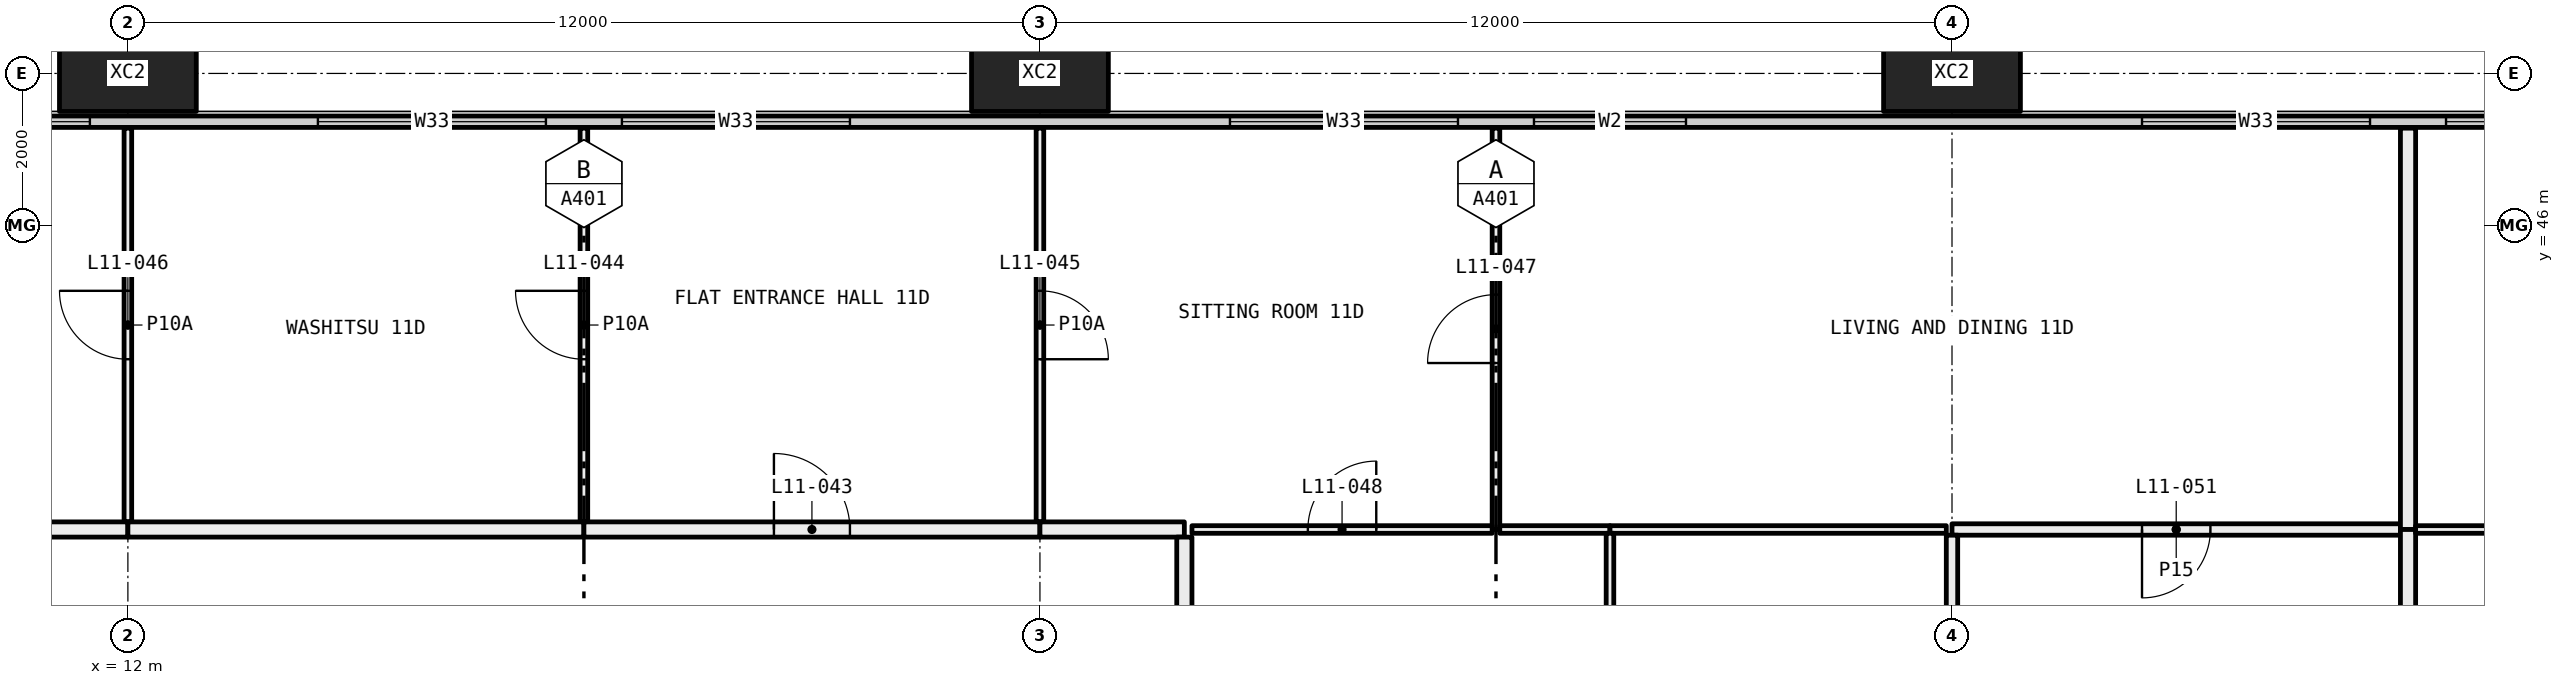
"""IFC4 building model, lengths in metres.
Left out: names, types, materials, properties, quantities, classifications, styles, units other than length and angle.
Written with IfcOpenShell. Run it as: python <this file> out.ifc"""

import sys

from ifc_helpers import new_model, si_unit, direction, frame, frame_2d, origin, origin_2d, place, context, subcontext, project, spatial, rectangle, hollow_rectangle, extrude, element, fill, save


model = new_model("IFC4")
c1 = context("Model", 3, precision=1e-05, world=origin(), true_north=direction((0.0, 1.0)))
c2 = subcontext(c1, "Body", "Model", "MODEL_VIEW")
j1 = project(units=[si_unit("LENGTHUNIT", "METRE"), si_unit("PLANEANGLEUNIT", "RADIAN")], contexts=[c1])
p1 = place(None, origin())
s1 = spatial("IfcSite", under=j1, at=p1, CompositionType="ELEMENT")
p2 = place(p1, origin())
s2 = spatial("IfcBuilding", under=s1, at=p2, CompositionType="ELEMENT")
p3 = place(p2, frame((0.0, 0.0, 50.7)))
s3 = spatial("IfcBuildingStorey", under=s2, at=p3, CompositionType="ELEMENT", Elevation=50.7)
for number, where, z_axis, x_axis in (
    (1, (12.0, 48.0, -0.4), (0.0, 0.0, 1.0), (1.0, 0.0, 0.0)),
    (2, (24.0, 48.0, -0.4), (0.0, 0.0, 1.0), (1.0, 0.0, 0.0)),
    (3, (36.0, 48.0, -0.4), (0.0, 0.0, 1.0), (1.0, 0.0, 0.0)),
):
    element("IfcColumn", number, at=place(p3, frame(where, z_axis=z_axis, x_axis=x_axis)), inside=s3, PredefinedType="COLUMN", context=c2, shape_type="SweptSolid", body=[
        extrude(hollow_rectangle(XDim=1.8, YDim=1.0, WallThickness=0.07, at=origin_2d()), origin(), (0.0, 0.0, 1.0), 3.45),
    ])
p4 = place(p3, frame((6.56, 47.365, 0.0), z_axis=(0.0, 0.0, 1.0), x_axis=(1.0, 0.0, 0.0)))
e4 = element("IfcWall", 4, at=p4, inside=s3, PredefinedType="ELEMENTEDWALL", context=c2, shape_type="SweptSolid", body=[
    extrude(rectangle(XDim=58.88, YDim=0.15, at=frame_2d((29.44, 0.0))), origin(), (0.0, 0.0, 1.0), 3.05),
])
p5 = place(p4, frame((0.44, 0.0, 0.45)))
e5 = element("IfcOpeningElement", 5, at=p5, cuts=e4, PredefinedType="OPENING", context=c2, shape_type="SweptSolid", body=[
    extrude(rectangle(XDim=4.5, YDim=2.55, at=frame_2d((2.25, 1.275))), frame((0.0, 0.085, 0.0), z_axis=(0.0, -1.0, 0.0), x_axis=(1.0, 0.0, 0.0)), (0.0, 0.0, 1.0), 0.17),
])
p6 = place(p4, frame((7.94, 0.0, 0.45)))
e6 = element("IfcOpeningElement", 6, at=p6, cuts=e4, PredefinedType="OPENING", context=c2, shape_type="SweptSolid", body=[
    extrude(rectangle(XDim=3.0, YDim=2.55, at=frame_2d((1.5, 1.275))), frame((0.0, 0.085, 0.0), z_axis=(0.0, -1.0, 0.0), x_axis=(1.0, 0.0, 0.0)), (0.0, 0.0, 1.0), 0.17),
])
p7 = place(p4, frame((11.94, 0.0, 0.45)))
e7 = element("IfcOpeningElement", 7, at=p7, cuts=e4, PredefinedType="OPENING", context=c2, shape_type="SweptSolid", body=[
    extrude(rectangle(XDim=3.0, YDim=2.55, at=frame_2d((1.5, 1.275))), frame((0.0, 0.085, 0.0), z_axis=(0.0, -1.0, 0.0), x_axis=(1.0, 0.0, 0.0)), (0.0, 0.0, 1.0), 0.17),
])
p8 = place(p4, frame((19.94, 0.0, 0.45)))
e8 = element("IfcOpeningElement", 8, at=p8, cuts=e4, PredefinedType="OPENING", context=c2, shape_type="SweptSolid", body=[
    extrude(rectangle(XDim=3.0, YDim=2.55, at=frame_2d((1.5, 1.275))), frame((0.0, 0.085, 0.0), z_axis=(0.0, -1.0, 0.0), x_axis=(1.0, 0.0, 0.0)), (0.0, 0.0, 1.0), 0.17),
])
p9 = place(p4, frame((23.94, 0.0, 0.45)))
e9 = element("IfcOpeningElement", 9, at=p9, cuts=e4, PredefinedType="OPENING", context=c2, shape_type="SweptSolid", body=[
    extrude(rectangle(XDim=2.0, YDim=2.55, at=frame_2d((1.0, 1.275))), frame((0.0, 0.085, 0.0), z_axis=(0.0, -1.0, 0.0), x_axis=(1.0, 0.0, 0.0)), (0.0, 0.0, 1.0), 0.17),
])
p10 = place(p4, frame((31.94, 0.0, 0.45)))
e10 = element("IfcOpeningElement", 10, at=p10, cuts=e4, PredefinedType="OPENING", context=c2, shape_type="SweptSolid", body=[
    extrude(rectangle(XDim=3.0, YDim=2.55, at=frame_2d((1.5, 1.275))), frame((0.0, 0.085, 0.0), z_axis=(0.0, -1.0, 0.0), x_axis=(1.0, 0.0, 0.0)), (0.0, 0.0, 1.0), 0.17),
])
p11 = place(p4, frame((35.94, 0.0, 0.45)))
e11 = element("IfcOpeningElement", 11, at=p11, cuts=e4, PredefinedType="OPENING", context=c2, shape_type="SweptSolid", body=[
    extrude(rectangle(XDim=3.0, YDim=2.55, at=frame_2d((1.5, 1.275))), frame((0.0, 0.085, 0.0), z_axis=(0.0, -1.0, 0.0), x_axis=(1.0, 0.0, 0.0)), (0.0, 0.0, 1.0), 0.17),
])
p12 = place(p4, frame((43.94, 0.0, 0.45)))
e12 = element("IfcOpeningElement", 12, at=p12, cuts=e4, PredefinedType="OPENING", context=c2, shape_type="SweptSolid", body=[
    extrude(rectangle(XDim=3.0, YDim=2.55, at=frame_2d((1.5, 1.275))), frame((0.0, 0.085, 0.0), z_axis=(0.0, -1.0, 0.0), x_axis=(1.0, 0.0, 0.0)), (0.0, 0.0, 1.0), 0.17),
])
p13 = place(p4, frame((47.94, 0.0, 0.45)))
e13 = element("IfcOpeningElement", 13, at=p13, cuts=e4, PredefinedType="OPENING", context=c2, shape_type="SweptSolid", body=[
    extrude(rectangle(XDim=2.0, YDim=2.55, at=frame_2d((1.0, 1.275))), frame((0.0, 0.085, 0.0), z_axis=(0.0, -1.0, 0.0), x_axis=(1.0, 0.0, 0.0)), (0.0, 0.0, 1.0), 0.17),
])
p14 = place(p4, frame((53.94, 0.0, 0.45)))
e14 = element("IfcOpeningElement", 14, at=p14, cuts=e4, PredefinedType="OPENING", context=c2, shape_type="SweptSolid", body=[
    extrude(rectangle(XDim=4.5, YDim=2.55, at=frame_2d((2.25, 1.275))), frame((0.0, 0.085, 0.0), z_axis=(0.0, -1.0, 0.0), x_axis=(1.0, 0.0, 0.0)), (0.0, 0.0, 1.0), 0.17),
])
p15 = place(p3, frame((12.0, 42.1, 0.0), z_axis=(0.0, 0.0, 1.0), x_axis=(0.0, 1.0, 0.0)))
e15 = element("IfcWall", 15, at=p15, inside=s3, PredefinedType="PARTITIONING", context=c2, shape_type="SweptSolid", body=[
    extrude(rectangle(XDim=5.18, YDim=0.1, at=frame_2d((2.59, 0.0))), origin(), (0.0, 0.0, 1.0), 3.05),
])
p16 = place(p15, frame((2.14, 0.0, 0.0)))
e16 = element("IfcOpeningElement", 16, at=p16, cuts=e15, PredefinedType="OPENING", context=c2, shape_type="SweptSolid", body=[
    extrude(rectangle(XDim=0.9, YDim=2.1, at=frame_2d((0.45, 1.05))), frame((0.0, 0.06, 0.0), z_axis=(0.0, -1.0, 0.0), x_axis=(1.0, 0.0, 0.0)), (0.0, 0.0, 1.0), 0.12),
])
p17 = place(p3, frame((10.1, 42.0, 0.0), z_axis=(0.0, 0.0, 1.0), x_axis=(1.0, 0.0, 0.0)))
e17 = element("IfcWall", 17, at=p17, inside=s3, PredefinedType="PARTITIONING", context=c2, shape_type="SweptSolid", body=[
    extrude(rectangle(XDim=1.9, YDim=0.2, at=frame_2d((0.95, 0.0))), origin(), (0.0, 0.0, 1.0), 3.05),
])
p18 = place(p3, frame((18.0, 42.1, 0.0), z_axis=(0.0, 0.0, 1.0), x_axis=(0.0, 1.0, 0.0)))
e18 = element("IfcWall", 18, at=p18, inside=s3, PredefinedType="PARTITIONING", context=c2, shape_type="SweptSolid", body=[
    extrude(rectangle(XDim=5.18, YDim=0.1, at=frame_2d((2.59, 0.0))), origin(), (0.0, 0.0, 1.0), 3.05),
])
p19 = place(p18, frame((2.14, 0.0, 0.0)))
e19 = element("IfcOpeningElement", 19, at=p19, cuts=e18, PredefinedType="OPENING", context=c2, shape_type="SweptSolid", body=[
    extrude(rectangle(XDim=0.9, YDim=2.1, at=frame_2d((0.45, 1.05))), frame((0.0, 0.06, 0.0), z_axis=(0.0, -1.0, 0.0), x_axis=(1.0, 0.0, 0.0)), (0.0, 0.0, 1.0), 0.12),
])
p20 = place(p3, frame((12.0, 42.0, 0.0), z_axis=(0.0, 0.0, 1.0), x_axis=(1.0, 0.0, 0.0)))
e20 = element("IfcWall", 20, at=p20, inside=s3, PredefinedType="PARTITIONING", context=c2, shape_type="SweptSolid", body=[
    extrude(rectangle(XDim=6.0, YDim=0.2, at=frame_2d((3.0, 0.0))), origin(), (0.0, 0.0, 1.0), 3.05),
])
p21 = place(p3, frame((24.0, 42.1, 0.0), z_axis=(0.0, 0.0, 1.0), x_axis=(0.0, 1.0, 0.0)))
e21 = element("IfcWall", 21, at=p21, inside=s3, PredefinedType="PARTITIONING", context=c2, shape_type="SweptSolid", body=[
    extrude(rectangle(XDim=5.18, YDim=0.1, at=frame_2d((2.59, 0.0))), origin(), (0.0, 0.0, 1.0), 3.05),
])
p22 = place(p21, frame((2.14, 0.0, 0.0)))
e22 = element("IfcOpeningElement", 22, at=p22, cuts=e21, PredefinedType="OPENING", context=c2, shape_type="SweptSolid", body=[
    extrude(rectangle(XDim=0.9, YDim=2.1, at=frame_2d((0.45, 1.05))), frame((0.0, 0.06, 0.0), z_axis=(0.0, -1.0, 0.0), x_axis=(1.0, 0.0, 0.0)), (0.0, 0.0, 1.0), 0.12),
])
p23 = place(p3, frame((18.0, 42.0, 0.0), z_axis=(0.0, 0.0, 1.0), x_axis=(1.0, 0.0, 0.0)))
e23 = element("IfcWall", 23, at=p23, inside=s3, PredefinedType="PARTITIONING", context=c2, shape_type="SweptSolid", body=[
    extrude(rectangle(XDim=6.0, YDim=0.2, at=frame_2d((3.0, 0.0))), origin(), (0.0, 0.0, 1.0), 3.05),
])
p24 = place(p23, frame((2.5, 0.0, 0.0)))
e24 = element("IfcOpeningElement", 24, at=p24, cuts=e23, PredefinedType="OPENING", context=c2, shape_type="SweptSolid", body=[
    extrude(rectangle(XDim=1.0, YDim=2.1, at=frame_2d((0.5, 1.05))), frame((0.0, 0.11, 0.0), z_axis=(0.0, -1.0, 0.0), x_axis=(1.0, 0.0, 0.0)), (0.0, 0.0, 1.0), 0.22),
])
p25 = place(p3, frame((30.0, 42.0, 0.0), z_axis=(0.0, 0.0, 1.0), x_axis=(0.0, 1.0, 0.0)))
e25 = element("IfcWall", 25, at=p25, inside=s3, PredefinedType="PARTITIONING", context=c2, shape_type="SweptSolid", body=[
    extrude(rectangle(XDim=5.28, YDim=0.1, at=frame_2d((2.64, 0.0))), origin(), (0.0, 0.0, 1.0), 3.05),
])
p26 = place(p25, frame((2.19, 0.0, 0.0)))
e26 = element("IfcOpeningElement", 26, at=p26, cuts=e25, PredefinedType="OPENING", context=c2, shape_type="SweptSolid", body=[
    extrude(rectangle(XDim=0.9, YDim=2.1, at=frame_2d((0.45, 1.05))), frame((0.0, 0.06, 0.0), z_axis=(0.0, -1.0, 0.0), x_axis=(1.0, 0.0, 0.0)), (0.0, 0.0, 1.0), 0.12),
])
p27 = place(p3, frame((26.0, 42.0, 0.0), z_axis=(0.0, 0.0, 1.0), x_axis=(1.0, 0.0, 0.0)))
e27 = element("IfcWall", 27, at=p27, inside=s3, PredefinedType="PARTITIONING", context=c2, shape_type="SweptSolid", body=[
    extrude(rectangle(XDim=3.95, YDim=0.1, at=frame_2d((1.975, 0.0))), origin(), (0.0, 0.0, 1.0), 3.05),
])
p28 = place(p27, frame((1.525, 0.0, 0.0)))
e28 = element("IfcOpeningElement", 28, at=p28, cuts=e27, PredefinedType="OPENING", context=c2, shape_type="SweptSolid", body=[
    extrude(rectangle(XDim=0.9, YDim=2.1, at=frame_2d((0.45, 1.05))), frame((0.0, 0.06, 0.0), z_axis=(0.0, -1.0, 0.0), x_axis=(1.0, 0.0, 0.0)), (0.0, 0.0, 1.0), 0.12),
])
p29 = place(p3, frame((24.0, 42.0, 0.0), z_axis=(0.0, 0.0, 1.0), x_axis=(1.0, 0.0, 0.0)))
e29 = element("IfcWall", 29, at=p29, inside=s3, PredefinedType="PARTITIONING", context=c2, shape_type="SweptSolid", body=[
    extrude(rectangle(XDim=1.9, YDim=0.2, at=frame_2d((0.95, 0.0))), origin(), (0.0, 0.0, 1.0), 3.05),
])
p30 = place(p3, frame((30.05, 42.0, 0.0), z_axis=(0.0, 0.0, 1.0), x_axis=(1.0, 0.0, 0.0)))
e30 = element("IfcWall", 30, at=p30, inside=s3, PredefinedType="PARTITIONING", context=c2, shape_type="SweptSolid", body=[
    extrude(rectangle(XDim=1.45, YDim=0.1, at=frame_2d((0.725, 0.0))), origin(), (0.0, 0.0, 1.0), 3.05),
])
p31 = place(p3, frame((31.5, 42.0, 0.0), z_axis=(0.0, 0.0, 1.0), x_axis=(1.0, 0.0, 0.0)))
e31 = element("IfcWall", 31, at=p31, inside=s3, PredefinedType="PARTITIONING", context=c2, shape_type="SweptSolid", body=[
    extrude(rectangle(XDim=4.425, YDim=0.1, at=frame_2d((2.212, 0.0))), origin(), (0.0, 0.0, 1.0), 2.45),
])
p32 = place(p3, frame((36.0, 42.0, 0.0), z_axis=(0.0, 0.0, 1.0), x_axis=(1.0, 0.0, 0.0)))
e32 = element("IfcWall", 32, at=p32, inside=s3, PredefinedType="PARTITIONING", context=c2, shape_type="SweptSolid", body=[
    extrude(rectangle(XDim=5.9, YDim=0.15, at=frame_2d((2.95, 0.0))), origin(), (0.0, 0.0, 1.0), 2.45),
])
p33 = place(p32, frame((2.5, 0.0, 0.0)))
e33 = element("IfcOpeningElement", 33, at=p33, cuts=e32, PredefinedType="OPENING", context=c2, shape_type="SweptSolid", body=[
    extrude(rectangle(XDim=0.9, YDim=2.1, at=frame_2d((0.45, 1.05))), frame((0.0, 0.085, 0.0), z_axis=(0.0, -1.0, 0.0), x_axis=(1.0, 0.0, 0.0)), (0.0, 0.0, 1.0), 0.17),
])
p34 = place(p3, frame((42.0, 42.0, 0.0), z_axis=(0.0, 0.0, 1.0), x_axis=(0.0, 1.0, 0.0)))
e34 = element("IfcWall", 34, at=p34, inside=s3, PredefinedType="PARTITIONING", context=c2, shape_type="SweptSolid", body=[
    extrude(rectangle(XDim=5.28, YDim=0.2, at=frame_2d((2.64, 0.0))), origin(), (0.0, 0.0, 1.0), 3.05),
])
p35 = place(p3, frame((31.5, 36.1, 0.0), z_axis=(0.0, 0.0, 1.0), x_axis=(0.0, 1.0, 0.0)))
e35 = element("IfcWall", 35, at=p35, inside=s3, PredefinedType="PARTITIONING", context=c2, shape_type="SweptSolid", body=[
    extrude(rectangle(XDim=5.85, YDim=0.1, at=frame_2d((2.925, 0.0))), origin(), (0.0, 0.0, 1.0), 3.05),
])
p36 = place(p35, frame((2.475, 0.0, 0.0)))
e36 = element("IfcOpeningElement", 36, at=p36, cuts=e35, PredefinedType="OPENING", context=c2, shape_type="SweptSolid", body=[
    extrude(rectangle(XDim=0.9, YDim=2.1, at=frame_2d((0.45, 1.05))), frame((0.0, 0.06, 0.0), z_axis=(0.0, -1.0, 0.0), x_axis=(1.0, 0.0, 0.0)), (0.0, 0.0, 1.0), 0.12),
])
p37 = place(p3, frame((25.9, 41.9, 0.0), z_axis=(0.0, 0.0, 1.0), x_axis=(0.0, -1.0, 0.0)))
e37 = element("IfcWall", 37, at=p37, inside=s3, PredefinedType="PARTITIONING", context=c2, shape_type="SweptSolid", body=[
    extrude(rectangle(XDim=6.2, YDim=0.2, at=frame_2d((3.1, 0.0))), origin(), (0.0, 0.0, 1.0), 2.45),
])
p38 = place(p3, frame((36.0, 38.1, 0.0), z_axis=(0.0, 0.0, 1.0), x_axis=(0.0, 1.0, 0.0)))
e38 = element("IfcWall", 38, at=p38, inside=s3, PredefinedType="PARTITIONING", context=c2, shape_type="SweptSolid", body=[
    extrude(rectangle(XDim=3.825, YDim=0.15, at=frame_2d((1.913, 0.0))), origin(), (0.0, 0.0, 1.0), 2.45),
])
p39 = place(p3, frame((42.0, 38.1, 0.0), z_axis=(0.0, 0.0, 1.0), x_axis=(0.0, 1.0, 0.0)))
e39 = element("IfcWall", 39, at=p39, inside=s3, PredefinedType="PARTITIONING", context=c2, shape_type="SweptSolid", body=[
    extrude(rectangle(XDim=3.9, YDim=0.2, at=frame_2d((1.95, 0.0))), origin(), (0.0, 0.0, 1.0), 3.05),
])
p40 = place(p3, frame((42.1, 42.0, 0.0), z_axis=(0.0, 0.0, 1.0), x_axis=(1.0, 0.0, 0.0)))
e40 = element("IfcWall", 40, at=p40, inside=s3, PredefinedType="PARTITIONING", context=c2, shape_type="SweptSolid", body=[
    extrude(rectangle(XDim=3.9, YDim=0.1, at=frame_2d((1.95, 0.0))), origin(), (0.0, 0.0, 1.0), 3.05),
])
p41 = place(p40, frame((1.5, 0.0, 0.0)))
e41 = element("IfcOpeningElement", 41, at=p41, cuts=e40, PredefinedType="OPENING", context=c2, shape_type="SweptSolid", body=[
    extrude(rectangle(XDim=0.9, YDim=2.1, at=frame_2d((0.45, 1.05))), frame((0.0, 0.06, 0.0), z_axis=(0.0, -1.0, 0.0), x_axis=(1.0, 0.0, 0.0)), (0.0, 0.0, 1.0), 0.12),
])
p42 = place(p5, origin())
e42 = element("IfcWindow", 42, at=p42, inside=s3, PartitioningType="SINGLE_PANEL", PredefinedType="WINDOW", context=c2, shape_type="SweptSolid", body=[
    extrude(rectangle(XDim=4.5, YDim=2.55, at=frame_2d((2.25, 1.275))), frame((0.0, 0.03, 0.0), z_axis=(0.0, -1.0, 0.0), x_axis=(1.0, 0.0, 0.0)), (0.0, 0.0, 1.0), 0.06),
])
fill(e5, e42)
p43 = place(p6, origin())
e43 = element("IfcWindow", 43, at=p43, inside=s3, PartitioningType="SINGLE_PANEL", PredefinedType="WINDOW", context=c2, shape_type="SweptSolid", body=[
    extrude(rectangle(XDim=3.0, YDim=2.55, at=frame_2d((1.5, 1.275))), frame((0.0, 0.03, 0.0), z_axis=(0.0, -1.0, 0.0), x_axis=(1.0, 0.0, 0.0)), (0.0, 0.0, 1.0), 0.06),
])
fill(e6, e43)
p44 = place(p7, origin())
e44 = element("IfcWindow", 44, at=p44, inside=s3, PartitioningType="SINGLE_PANEL", PredefinedType="WINDOW", context=c2, shape_type="SweptSolid", body=[
    extrude(rectangle(XDim=3.0, YDim=2.55, at=frame_2d((1.5, 1.275))), frame((0.0, 0.03, 0.0), z_axis=(0.0, -1.0, 0.0), x_axis=(1.0, 0.0, 0.0)), (0.0, 0.0, 1.0), 0.06),
])
fill(e7, e44)
p45 = place(p8, origin())
e45 = element("IfcWindow", 45, at=p45, inside=s3, PartitioningType="SINGLE_PANEL", PredefinedType="WINDOW", context=c2, shape_type="SweptSolid", body=[
    extrude(rectangle(XDim=3.0, YDim=2.55, at=frame_2d((1.5, 1.275))), frame((0.0, 0.03, 0.0), z_axis=(0.0, -1.0, 0.0), x_axis=(1.0, 0.0, 0.0)), (0.0, 0.0, 1.0), 0.06),
])
fill(e8, e45)
p46 = place(p9, origin())
e46 = element("IfcWindow", 46, at=p46, inside=s3, PartitioningType="SINGLE_PANEL", PredefinedType="WINDOW", context=c2, shape_type="SweptSolid", body=[
    extrude(rectangle(XDim=2.0, YDim=2.55, at=frame_2d((1.0, 1.275))), frame((0.0, 0.03, 0.0), z_axis=(0.0, -1.0, 0.0), x_axis=(1.0, 0.0, 0.0)), (0.0, 0.0, 1.0), 0.06),
])
fill(e9, e46)
p47 = place(p10, origin())
e47 = element("IfcWindow", 47, at=p47, inside=s3, PartitioningType="SINGLE_PANEL", PredefinedType="WINDOW", context=c2, shape_type="SweptSolid", body=[
    extrude(rectangle(XDim=3.0, YDim=2.55, at=frame_2d((1.5, 1.275))), frame((0.0, 0.03, 0.0), z_axis=(0.0, -1.0, 0.0), x_axis=(1.0, 0.0, 0.0)), (0.0, 0.0, 1.0), 0.06),
])
fill(e10, e47)
p48 = place(p11, origin())
e48 = element("IfcWindow", 48, at=p48, inside=s3, PartitioningType="SINGLE_PANEL", PredefinedType="WINDOW", context=c2, shape_type="SweptSolid", body=[
    extrude(rectangle(XDim=3.0, YDim=2.55, at=frame_2d((1.5, 1.275))), frame((0.0, 0.03, 0.0), z_axis=(0.0, -1.0, 0.0), x_axis=(1.0, 0.0, 0.0)), (0.0, 0.0, 1.0), 0.06),
])
fill(e11, e48)
p49 = place(p24, origin())
e49 = element("IfcDoor", 49, at=p49, inside=s3, OperationType="SINGLE_SWING_RIGHT", PredefinedType="DOOR", context=c2, shape_type="SweptSolid", body=[
    extrude(rectangle(XDim=1.0, YDim=2.1, at=frame_2d((0.5, 1.05))), frame((0.0, 0.025, 0.0), z_axis=(0.0, -1.0, 0.0), x_axis=(1.0, 0.0, 0.0)), (0.0, 0.0, 1.0), 0.05),
])
fill(e24, e49)
p50 = place(p19, origin())
e50 = element("IfcDoor", 50, at=p50, inside=s3, OperationType="SINGLE_SWING_LEFT", PredefinedType="DOOR", context=c2, shape_type="SweptSolid", body=[
    extrude(rectangle(XDim=0.9, YDim=2.1, at=frame_2d((0.45, 1.05))), frame((0.0, 0.025, 0.0), z_axis=(0.0, -1.0, 0.0), x_axis=(1.0, 0.0, 0.0)), (0.0, 0.0, 1.0), 0.05),
])
fill(e19, e50)
p51 = place(p22, frame((0.9, 0.0, 0.0), x_axis=(-1.0, 0.0, 0.0)))
e51 = element("IfcDoor", 51, at=p51, inside=s3, OperationType="SINGLE_SWING_LEFT", PredefinedType="DOOR", context=c2, shape_type="SweptSolid", body=[
    extrude(rectangle(XDim=0.9, YDim=2.1, at=frame_2d((0.45, 1.05))), frame((0.0, 0.025, 0.0), z_axis=(0.0, -1.0, 0.0), x_axis=(1.0, 0.0, 0.0)), (0.0, 0.0, 1.0), 0.05),
])
fill(e22, e51)
p52 = place(p16, origin())
e52 = element("IfcDoor", 52, at=p52, inside=s3, OperationType="SINGLE_SWING_LEFT", PredefinedType="DOOR", context=c2, shape_type="SweptSolid", body=[
    extrude(rectangle(XDim=0.9, YDim=2.1, at=frame_2d((0.45, 1.05))), frame((0.0, 0.025, 0.0), z_axis=(0.0, -1.0, 0.0), x_axis=(1.0, 0.0, 0.0)), (0.0, 0.0, 1.0), 0.05),
])
fill(e16, e52)
p53 = place(p26, origin())
e53 = element("IfcDoor", 53, at=p53, inside=s3, OperationType="SINGLE_SWING_RIGHT", PredefinedType="DOOR", context=c2, shape_type="SweptSolid", body=[
    extrude(rectangle(XDim=0.9, YDim=2.1, at=frame_2d((0.45, 1.05))), frame((0.0, 0.025, 0.0), z_axis=(0.0, -1.0, 0.0), x_axis=(1.0, 0.0, 0.0)), (0.0, 0.0, 1.0), 0.05),
])
fill(e26, e53)
p54 = place(p28, origin())
e54 = element("IfcDoor", 54, at=p54, inside=s3, OperationType="SINGLE_SWING_LEFT", PredefinedType="DOOR", context=c2, shape_type="SweptSolid", body=[
    extrude(rectangle(XDim=0.9, YDim=2.1, at=frame_2d((0.45, 1.05))), frame((0.0, 0.025, 0.0), z_axis=(0.0, -1.0, 0.0), x_axis=(1.0, 0.0, 0.0)), (0.0, 0.0, 1.0), 0.05),
])
fill(e28, e54)
p55 = place(p33, frame((0.9, 0.0, 0.0), x_axis=(-1.0, 0.0, 0.0)))
e55 = element("IfcDoor", 55, at=p55, inside=s3, OperationType="SINGLE_SWING_LEFT", PredefinedType="DOOR", context=c2, shape_type="SweptSolid", body=[
    extrude(rectangle(XDim=0.9, YDim=2.1, at=frame_2d((0.45, 1.05))), frame((0.0, 0.025, 0.0), z_axis=(0.0, -1.0, 0.0), x_axis=(1.0, 0.0, 0.0)), (0.0, 0.0, 1.0), 0.05),
])
fill(e33, e55)
save(model, sys.argv[1])
